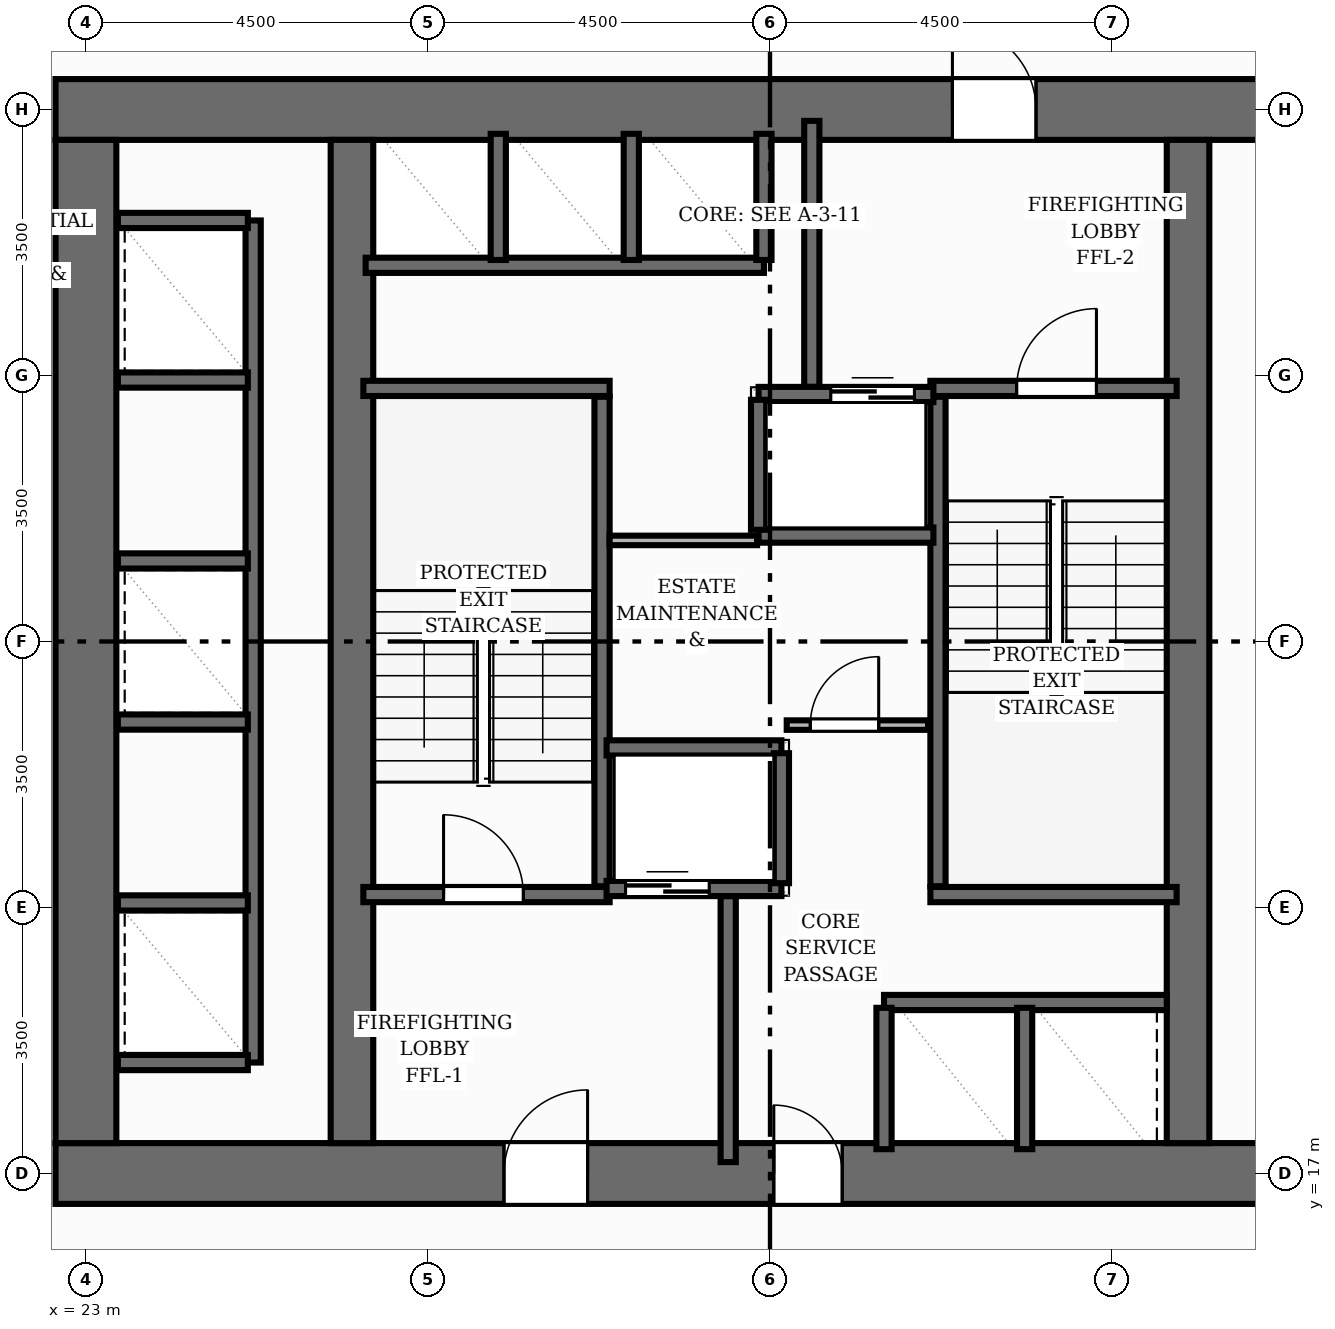
"""IFC4 building model, lengths in metres.
Left out: names, types, materials, properties, quantities, classifications, styles, units other than length and angle.
Written with IfcOpenShell. Run it as: python <this file> out.ifc"""

import sys

from ifc_helpers import new_model, si_unit, direction, frame, frame_2d, origin, place, context, subcontext, project, spatial, rectangle, extrude, element, fill, save


model = new_model("IFC4")
c1 = context("Model", 3, precision=1e-05, world=origin(), true_north=direction((0.0, 1.0)))
c2 = subcontext(c1, "Body", "Model", "MODEL_VIEW")
j1 = project(units=[si_unit("LENGTHUNIT", "METRE"), si_unit("PLANEANGLEUNIT", "RADIAN")], contexts=[c1])
p1 = place(None, origin())
s1 = spatial("IfcSite", under=j1, at=p1, CompositionType="ELEMENT")
p2 = place(p1, origin())
s2 = spatial("IfcBuilding", under=s1, at=p2, CompositionType="ELEMENT")
p3 = place(p2, frame((0.0, 0.0, 44.0)))
s3 = spatial("IfcBuildingStorey", under=s2, at=p3, CompositionType="ELEMENT", Elevation=44.0)
p4 = place(p3, frame((22.6, 17.0, 0.0), z_axis=(0.0, 0.0, 1.0), x_axis=(1.0, 0.0, 0.0)))
e1 = element("IfcWall", 1, at=p4, inside=s3, PredefinedType="SHEAR", context=c2, shape_type="SweptSolid", body=[
    extrude(rectangle(XDim=18.8, YDim=0.8, at=frame_2d((9.4, 0.0))), origin(), (0.0, 0.0, 1.0), 3.2),
])
p5 = place(p4, frame((5.9, 0.0, 0.0)))
e2 = element("IfcOpeningElement", 2, at=p5, cuts=e1, PredefinedType="OPENING", context=c2, shape_type="SweptSolid", body=[
    extrude(rectangle(XDim=1.1, YDim=2.15, at=frame_2d((0.55, 1.075))), frame((0.0, 0.41, 0.0), z_axis=(0.0, -1.0, 0.0), x_axis=(1.0, 0.0, 0.0)), (0.0, 0.0, 1.0), 0.82),
])
p6 = place(p4, frame((9.45, 0.0, 0.0)))
e3 = element("IfcOpeningElement", 3, at=p6, cuts=e1, PredefinedType="OPENING", context=c2, shape_type="SweptSolid", body=[
    extrude(rectangle(XDim=0.9, YDim=2.1, at=frame_2d((0.45, 1.05))), frame((0.0, 0.41, 0.0), z_axis=(0.0, -1.0, 0.0), x_axis=(1.0, 0.0, 0.0)), (0.0, 0.0, 1.0), 0.82),
])
p7 = place(p3, frame((22.6, 31.0, 0.0), z_axis=(0.0, 0.0, 1.0), x_axis=(1.0, 0.0, 0.0)))
e4 = element("IfcWall", 4, at=p7, inside=s3, PredefinedType="SHEAR", context=c2, shape_type="SweptSolid", body=[
    extrude(rectangle(XDim=18.8, YDim=0.8, at=frame_2d((9.4, 0.0))), origin(), (0.0, 0.0, 1.0), 3.2),
])
p8 = place(p7, frame((11.8, 0.0, 0.0)))
e5 = element("IfcOpeningElement", 5, at=p8, cuts=e4, PredefinedType="OPENING", context=c2, shape_type="SweptSolid", body=[
    extrude(rectangle(XDim=1.1, YDim=2.15, at=frame_2d((0.55, 1.075))), frame((0.0, 0.41, 0.0), z_axis=(0.0, -1.0, 0.0), x_axis=(1.0, 0.0, 0.0)), (0.0, 0.0, 1.0), 0.82),
])
p9 = place(p3, frame((23.0, 17.4, 0.0), z_axis=(0.0, 0.0, 1.0), x_axis=(0.0, 1.0, 0.0)))
e6 = element("IfcWall", 6, at=p9, inside=s3, PredefinedType="SHEAR", context=c2, shape_type="SweptSolid", body=[
    extrude(rectangle(XDim=13.2, YDim=0.8, at=frame_2d((6.6, 0.0))), origin(), (0.0, 0.0, 1.0), 3.2),
])
for number, where, z_axis, x_axis in (
    (7, (26.5, 17.4, 0.0), (0.0, 0.0, 1.0), (0.0, 1.0, 0.0)),
    (8, (37.5, 17.4, 0.0), (0.0, 0.0, 1.0), (0.0, 1.0, 0.0)),
):
    element("IfcWall", number, at=place(p3, frame(where, z_axis=z_axis, x_axis=x_axis)), inside=s3, PredefinedType="SHEAR", context=c2, shape_type="SweptSolid", body=[
        extrude(rectangle(XDim=13.2, YDim=0.56, at=frame_2d((6.6, 0.0))), origin(), (0.0, 0.0, 1.0), 3.2),
    ])
p10 = place(p3, frame((29.79, 20.78, 0.0), z_axis=(0.0, 0.0, 1.0), x_axis=(0.0, 1.0, 0.0)))
e9 = element("IfcWall", 9, at=p10, inside=s3, PredefinedType="SHEAR", context=c2, shape_type="SweptSolid", body=[
    extrude(rectangle(XDim=6.44, YDim=0.2, at=frame_2d((3.22, 0.0))), origin(), (0.0, 0.0, 1.0), 3.2),
])
p11 = place(p3, frame((26.65, 27.33, 0.0), z_axis=(0.0, 0.0, 1.0), x_axis=(1.0, 0.0, 0.0)))
e10 = element("IfcWall", 10, at=p11, inside=s3, PredefinedType="SHEAR", context=c2, shape_type="SweptSolid", body=[
    extrude(rectangle(XDim=3.24, YDim=0.2, at=frame_2d((1.62, 0.0))), origin(), (0.0, 0.0, 1.0), 3.2),
])
p12 = place(p3, frame((26.65, 20.67, 0.0), z_axis=(0.0, 0.0, 1.0), x_axis=(1.0, 0.0, 0.0)))
e11 = element("IfcWall", 11, at=p12, inside=s3, PredefinedType="SHEAR", context=c2, shape_type="SweptSolid", body=[
    extrude(rectangle(XDim=3.24, YDim=0.2, at=frame_2d((1.62, 0.0))), origin(), (0.0, 0.0, 1.0), 3.2),
])
p13 = place(p12, frame((1.055, 0.0, 0.0)))
e12 = element("IfcOpeningElement", 12, at=p13, cuts=e11, PredefinedType="OPENING", context=c2, shape_type="SweptSolid", body=[
    extrude(rectangle(XDim=1.05, YDim=2.15, at=frame_2d((0.525, 1.075))), frame((0.0, 0.11, 0.0), z_axis=(0.0, -1.0, 0.0), x_axis=(1.0, 0.0, 0.0)), (0.0, 0.0, 1.0), 0.22),
])
p14 = place(p3, frame((34.21, 20.78, 0.0), z_axis=(0.0, 0.0, 1.0), x_axis=(0.0, 1.0, 0.0)))
e13 = element("IfcWall", 13, at=p14, inside=s3, PredefinedType="SHEAR", context=c2, shape_type="SweptSolid", body=[
    extrude(rectangle(XDim=6.44, YDim=0.2, at=frame_2d((3.22, 0.0))), origin(), (0.0, 0.0, 1.0), 3.2),
])
p15 = place(p3, frame((34.11, 20.67, 0.0), z_axis=(0.0, 0.0, 1.0), x_axis=(1.0, 0.0, 0.0)))
e14 = element("IfcWall", 14, at=p15, inside=s3, PredefinedType="SHEAR", context=c2, shape_type="SweptSolid", body=[
    extrude(rectangle(XDim=3.24, YDim=0.2, at=frame_2d((1.62, 0.0))), origin(), (0.0, 0.0, 1.0), 3.2),
])
p16 = place(p3, frame((34.11, 27.33, 0.0), z_axis=(0.0, 0.0, 1.0), x_axis=(1.0, 0.0, 0.0)))
e15 = element("IfcWall", 15, at=p16, inside=s3, PredefinedType="SHEAR", context=c2, shape_type="SweptSolid", body=[
    extrude(rectangle(XDim=3.24, YDim=0.2, at=frame_2d((1.62, 0.0))), origin(), (0.0, 0.0, 1.0), 3.2),
])
p17 = place(p16, frame((1.135, 0.0, 0.0)))
e16 = element("IfcOpeningElement", 16, at=p17, cuts=e15, PredefinedType="OPENING", context=c2, shape_type="SweptSolid", body=[
    extrude(rectangle(XDim=1.05, YDim=2.15, at=frame_2d((0.525, 1.075))), frame((0.0, 0.11, 0.0), z_axis=(0.0, -1.0, 0.0), x_axis=(1.0, 0.0, 0.0)), (0.0, 0.0, 1.0), 0.22),
])
for number, where, z_axis, x_axis in (
    (17, (31.45, 17.15, 0.0), (0.0, 0.0, 1.0), (0.0, 1.0, 0.0)),
    (18, (32.55, 27.35, 0.0), (0.0, 0.0, 1.0), (0.0, 1.0, 0.0)),
):
    element("IfcWall", number, at=place(p3, frame(where, z_axis=z_axis, x_axis=x_axis)), inside=s3, PredefinedType="SHEAR", context=c2, shape_type="SweptSolid", body=[
        extrude(rectangle(XDim=3.5, YDim=0.2, at=frame_2d((1.75, 0.0))), origin(), (0.0, 0.0, 1.0), 3.2),
    ])
p18 = place(p3, frame((29.85, 20.75, 0.0), z_axis=(0.0, 0.0, 1.0), x_axis=(1.0, 0.0, 0.0)))
e19 = element("IfcWall", 19, at=p18, inside=s3, PredefinedType="SHEAR", context=c2, shape_type="SweptSolid", body=[
    extrude(rectangle(XDim=2.3, YDim=0.2, at=frame_2d((1.15, 0.0))), origin(), (0.0, 0.0, 1.0), 3.2),
])
p19 = place(p18, frame((0.25, 0.0, 0.0)))
e20 = element("IfcOpeningElement", 20, at=p19, cuts=e19, PredefinedType="OPENING", context=c2, shape_type="SweptSolid", body=[
    extrude(rectangle(XDim=1.1, YDim=2.15, at=frame_2d((0.55, 1.075))), frame((0.0, 0.11, 0.0), z_axis=(0.0, -1.0, 0.0), x_axis=(1.0, 0.0, 0.0)), (0.0, 0.0, 1.0), 0.22),
])
p20 = place(p3, frame((29.85, 22.6, 0.0), z_axis=(0.0, 0.0, 1.0), x_axis=(1.0, 0.0, 0.0)))
e21 = element("IfcWall", 21, at=p20, inside=s3, PredefinedType="SHEAR", context=c2, shape_type="SweptSolid", body=[
    extrude(rectangle(XDim=2.3, YDim=0.2, at=frame_2d((1.15, 0.0))), origin(), (0.0, 0.0, 1.0), 3.2),
])
p21 = place(p3, frame((32.15, 20.82, 0.0), z_axis=(0.0, 0.0, 1.0), x_axis=(0.0, 1.0, 0.0)))
e22 = element("IfcWall", 22, at=p21, inside=s3, PredefinedType="SHEAR", context=c2, shape_type="SweptSolid", body=[
    extrude(rectangle(XDim=1.71, YDim=0.2, at=frame_2d((0.855, 0.0))), origin(), (0.0, 0.0, 1.0), 3.2),
])
p22 = place(p3, frame((31.85, 27.25, 0.0), z_axis=(0.0, 0.0, 1.0), x_axis=(1.0, 0.0, 0.0)))
e23 = element("IfcWall", 23, at=p22, inside=s3, PredefinedType="SHEAR", context=c2, shape_type="SweptSolid", body=[
    extrude(rectangle(XDim=2.3, YDim=0.2, at=frame_2d((1.15, 0.0))), origin(), (0.0, 0.0, 1.0), 3.2),
])
p23 = place(p22, frame((0.95, 0.0, 0.0)))
e24 = element("IfcOpeningElement", 24, at=p23, cuts=e23, PredefinedType="OPENING", context=c2, shape_type="SweptSolid", body=[
    extrude(rectangle(XDim=1.1, YDim=2.15, at=frame_2d((0.55, 1.075))), frame((0.0, 0.11, 0.0), z_axis=(0.0, -1.0, 0.0), x_axis=(1.0, 0.0, 0.0)), (0.0, 0.0, 1.0), 0.22),
])
p24 = place(p3, frame((31.85, 25.4, 0.0), z_axis=(0.0, 0.0, 1.0), x_axis=(1.0, 0.0, 0.0)))
e25 = element("IfcWall", 25, at=p24, inside=s3, PredefinedType="SHEAR", context=c2, shape_type="SweptSolid", body=[
    extrude(rectangle(XDim=2.3, YDim=0.2, at=frame_2d((1.15, 0.0))), origin(), (0.0, 0.0, 1.0), 3.2),
])
p25 = place(p3, frame((31.85, 25.47, 0.0), z_axis=(0.0, 0.0, 1.0), x_axis=(0.0, 1.0, 0.0)))
e26 = element("IfcWall", 26, at=p25, inside=s3, PredefinedType="SHEAR", context=c2, shape_type="SweptSolid", body=[
    extrude(rectangle(XDim=1.71, YDim=0.2, at=frame_2d((0.855, 0.0))), origin(), (0.0, 0.0, 1.0), 3.2),
])
p26 = place(p3, frame((25.2, 18.46, 0.0), z_axis=(0.0, 0.0, 1.0), x_axis=(0.0, 1.0, 0.0)))
e27 = element("IfcWall", 27, at=p26, inside=s3, PredefinedType="SHEAR", context=c2, shape_type="SweptSolid", body=[
    extrude(rectangle(XDim=11.08, YDim=0.2, at=frame_2d((5.54, 0.0))), origin(), (0.0, 0.0, 1.0), 3.2),
])
for number, where, z_axis, x_axis in (
    (28, (23.42, 18.46, 0.0), (0.0, 0.0, 1.0), (1.0, 0.0, 0.0)),
    (29, (23.42, 29.54, 0.0), (0.0, 0.0, 1.0), (1.0, 0.0, 0.0)),
    (30, (23.42, 20.56, 0.0), (0.0, 0.0, 1.0), (1.0, 0.0, 0.0)),
    (31, (23.42, 22.94, 0.0), (0.0, 0.0, 1.0), (1.0, 0.0, 0.0)),
    (32, (23.42, 25.06, 0.0), (0.0, 0.0, 1.0), (1.0, 0.0, 0.0)),
    (33, (23.42, 27.44, 0.0), (0.0, 0.0, 1.0), (1.0, 0.0, 0.0)),
):
    element("IfcWall", number, at=place(p3, frame(where, z_axis=z_axis, x_axis=x_axis)), inside=s3, PredefinedType="SHEAR", context=c2, shape_type="SweptSolid", body=[
        extrude(rectangle(XDim=1.71, YDim=0.2, at=frame_2d((0.855, 0.0))), origin(), (0.0, 0.0, 1.0), 3.2),
    ])
p27 = place(p3, frame((26.68, 28.95, 0.0), z_axis=(0.0, 0.0, 1.0), x_axis=(1.0, 0.0, 0.0)))
e34 = element("IfcWall", 34, at=p27, inside=s3, PredefinedType="SHEAR", context=c2, shape_type="SweptSolid", body=[
    extrude(rectangle(XDim=5.24, YDim=0.2, at=frame_2d((2.62, 0.0))), origin(), (0.0, 0.0, 1.0), 3.2),
])
for number, where, z_axis, x_axis in (
    (35, (31.92, 29.02, 0.0), (0.0, 0.0, 1.0), (0.0, 1.0, 0.0)),
    (36, (28.425, 29.02, 0.0), (0.0, 0.0, 1.0), (0.0, 1.0, 0.0)),
    (37, (30.175, 29.02, 0.0), (0.0, 0.0, 1.0), (0.0, 1.0, 0.0)),
):
    element("IfcWall", number, at=place(p3, frame(where, z_axis=z_axis, x_axis=x_axis)), inside=s3, PredefinedType="SHEAR", context=c2, shape_type="SweptSolid", body=[
        extrude(rectangle(XDim=1.66, YDim=0.2, at=frame_2d((0.83, 0.0))), origin(), (0.0, 0.0, 1.0), 3.2),
    ])
p28 = place(p3, frame((33.5, 19.25, 0.0), z_axis=(0.0, 0.0, 1.0), x_axis=(1.0, 0.0, 0.0)))
e38 = element("IfcWall", 38, at=p28, inside=s3, PredefinedType="SHEAR", context=c2, shape_type="SweptSolid", body=[
    extrude(rectangle(XDim=3.72, YDim=0.2, at=frame_2d((1.86, 0.0))), origin(), (0.0, 0.0, 1.0), 3.2),
])
for number, where, z_axis, x_axis in (
    (39, (33.5, 17.32, 0.0), (0.0, 0.0, 1.0), (0.0, 1.0, 0.0)),
    (40, (35.35, 17.32, 0.0), (0.0, 0.0, 1.0), (0.0, 1.0, 0.0)),
):
    element("IfcWall", number, at=place(p3, frame(where, z_axis=z_axis, x_axis=x_axis)), inside=s3, PredefinedType="SHEAR", context=c2, shape_type="SweptSolid", body=[
        extrude(rectangle(XDim=1.86, YDim=0.2, at=frame_2d((0.93, 0.0))), origin(), (0.0, 0.0, 1.0), 3.2),
    ])
p29 = place(p3, frame((32.22, 22.9, 0.0), z_axis=(0.0, 0.0, 1.0), x_axis=(1.0, 0.0, 0.0)))
e41 = element("IfcWall", 41, at=p29, inside=s3, PredefinedType="PARTITIONING", context=c2, shape_type="SweptSolid", body=[
    extrude(rectangle(XDim=1.86, YDim=0.125, at=frame_2d((0.93, 0.0))), origin(), (0.0, 0.0, 1.0), 2.955),
])
p30 = place(p29, frame((0.31, 0.0, 0.0)))
e42 = element("IfcOpeningElement", 42, at=p30, cuts=e41, PredefinedType="OPENING", context=c2, shape_type="SweptSolid", body=[
    extrude(rectangle(XDim=0.9, YDim=2.1, at=frame_2d((0.45, 1.05))), frame((0.0, 0.073, 0.0), z_axis=(0.0, -1.0, 0.0), x_axis=(1.0, 0.0, 0.0)), (0.0, 0.0, 1.0), 0.145),
])
p31 = place(p3, frame((29.89, 25.33, 0.0), z_axis=(0.0, 0.0, 1.0), x_axis=(1.0, 0.0, 0.0)))
e43 = element("IfcWall", 43, at=p31, inside=s3, PredefinedType="PARTITIONING", context=c2, shape_type="SweptSolid", body=[
    extrude(rectangle(XDim=1.94, YDim=0.125, at=frame_2d((0.97, 0.0))), origin(), (0.0, 0.0, 1.0), 2.955),
])
p32 = place(p13, origin())
e44 = element("IfcDoor", 44, at=p32, inside=s3, OperationType="SINGLE_SWING_LEFT", PredefinedType="DOOR", context=c2, shape_type="SweptSolid", body=[
    extrude(rectangle(XDim=1.05, YDim=2.15, at=frame_2d((0.525, 1.075))), frame((0.0, 0.025, 0.0), z_axis=(0.0, -1.0, 0.0), x_axis=(1.0, 0.0, 0.0)), (0.0, 0.0, 1.0), 0.05),
])
fill(e12, e44)
p33 = place(p17, origin())
e45 = element("IfcDoor", 45, at=p33, inside=s3, OperationType="SINGLE_SWING_RIGHT", PredefinedType="DOOR", context=c2, shape_type="SweptSolid", body=[
    extrude(rectangle(XDim=1.05, YDim=2.15, at=frame_2d((0.525, 1.075))), frame((0.0, 0.025, 0.0), z_axis=(0.0, -1.0, 0.0), x_axis=(1.0, 0.0, 0.0)), (0.0, 0.0, 1.0), 0.05),
])
fill(e16, e45)
p34 = place(p5, origin())
e46 = element("IfcDoor", 46, at=p34, inside=s3, OperationType="SINGLE_SWING_RIGHT", PredefinedType="DOOR", context=c2, shape_type="SweptSolid", body=[
    extrude(rectangle(XDim=1.1, YDim=2.15, at=frame_2d((0.55, 1.075))), frame((0.0, 0.025, 0.0), z_axis=(0.0, -1.0, 0.0), x_axis=(1.0, 0.0, 0.0)), (0.0, 0.0, 1.0), 0.05),
])
fill(e2, e46)
p35 = place(p8, origin())
e47 = element("IfcDoor", 47, at=p35, inside=s3, OperationType="SINGLE_SWING_LEFT", PredefinedType="DOOR", context=c2, shape_type="SweptSolid", body=[
    extrude(rectangle(XDim=1.1, YDim=2.15, at=frame_2d((0.55, 1.075))), frame((0.0, 0.025, 0.0), z_axis=(0.0, -1.0, 0.0), x_axis=(1.0, 0.0, 0.0)), (0.0, 0.0, 1.0), 0.05),
])
fill(e5, e47)
p36 = place(p19, origin())
e48 = element("IfcDoor", 48, at=p36, inside=s3, OperationType="DOUBLE_DOOR_SLIDING", PredefinedType="DOOR", context=c2, shape_type="SweptSolid", body=[
    extrude(rectangle(XDim=1.1, YDim=2.15, at=frame_2d((0.55, 1.075))), frame((0.0, 0.025, 0.0), z_axis=(0.0, -1.0, 0.0), x_axis=(1.0, 0.0, 0.0)), (0.0, 0.0, 1.0), 0.05),
])
fill(e20, e48)
p37 = place(p23, origin())
e49 = element("IfcDoor", 49, at=p37, inside=s3, OperationType="DOUBLE_DOOR_SLIDING", PredefinedType="DOOR", context=c2, shape_type="SweptSolid", body=[
    extrude(rectangle(XDim=1.1, YDim=2.15, at=frame_2d((0.55, 1.075))), frame((0.0, 0.025, 0.0), z_axis=(0.0, -1.0, 0.0), x_axis=(1.0, 0.0, 0.0)), (0.0, 0.0, 1.0), 0.05),
])
fill(e24, e49)
p38 = place(p6, origin())
e50 = element("IfcDoor", 50, at=p38, inside=s3, OperationType="SINGLE_SWING_LEFT", PredefinedType="DOOR", context=c2, shape_type="SweptSolid", body=[
    extrude(rectangle(XDim=0.9, YDim=2.1, at=frame_2d((0.45, 1.05))), frame((0.0, 0.025, 0.0), z_axis=(0.0, -1.0, 0.0), x_axis=(1.0, 0.0, 0.0)), (0.0, 0.0, 1.0), 0.05),
])
fill(e3, e50)
p39 = place(p30, origin())
e51 = element("IfcDoor", 51, at=p39, inside=s3, OperationType="SINGLE_SWING_RIGHT", PredefinedType="DOOR", context=c2, shape_type="SweptSolid", body=[
    extrude(rectangle(XDim=0.9, YDim=2.1, at=frame_2d((0.45, 1.05))), frame((0.0, 0.025, 0.0), z_axis=(0.0, -1.0, 0.0), x_axis=(1.0, 0.0, 0.0)), (0.0, 0.0, 1.0), 0.05),
])
fill(e42, e51)
save(model, sys.argv[1])
